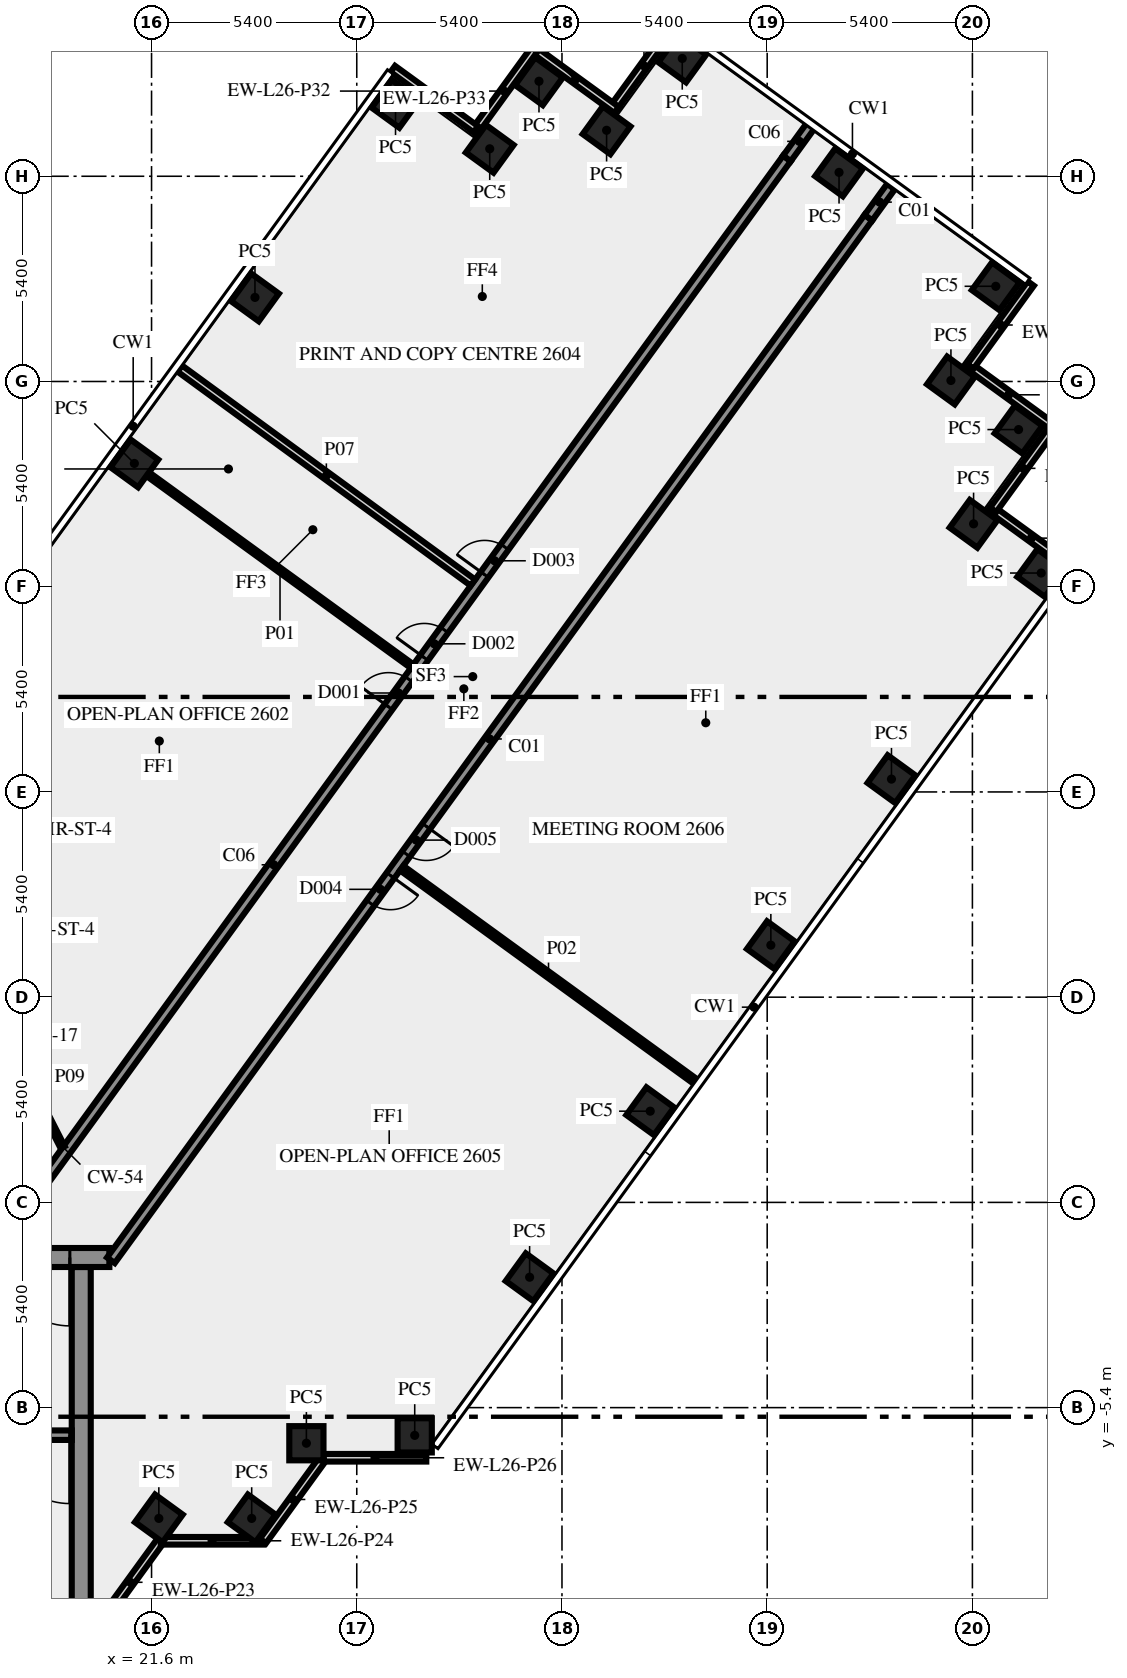
"""IFC4 building model, lengths in metres.
Left out: names, types, materials, properties, quantities, classifications, styles, units other than length and angle.
Written with IfcOpenShell. Run it as: python <this file> out.ifc"""

import sys

from ifc_helpers import new_model, si_unit, direction, frame, frame_2d, origin, origin_2d, place, context, subcontext, project, spatial, rectangle, extrude, element, fill, save


model = new_model("IFC4")
c1 = context("Model", 3, precision=1e-05, world=origin(), true_north=direction((0.0, 1.0)))
c2 = subcontext(c1, "Body", "Model", "MODEL_VIEW")
j1 = project(units=[si_unit("LENGTHUNIT", "METRE"), si_unit("PLANEANGLEUNIT", "RADIAN")], contexts=[c1])
p1 = place(None, origin())
s1 = spatial("IfcSite", under=j1, at=p1, CompositionType="ELEMENT")
p2 = place(p1, origin())
s2 = spatial("IfcBuilding", under=s1, at=p2, CompositionType="ELEMENT")
p3 = place(p2, frame((0.0, 0.0, 113.0)))
s3 = spatial("IfcBuildingStorey", under=s2, at=p3, CompositionType="ELEMENT", Elevation=113.0)
for number, where, z_axis, x_axis in (
    (1, (21.792, -8.315, 0.0), (0.0, 0.0, 1.0), (0.588, 0.809, 0.0)),
    (2, (24.235, -8.315, 0.0), (0.0, 0.0, 1.0), (0.588, 0.809, 0.0)),
    (3, (25.674, -6.337, 0.0), (0.0, 0.0, 1.0), (1.0, 0.0, 0.0)),
    (4, (28.525, -6.13, 0.0), (0.0, 0.0, 1.0), (1.0, 0.0, 0.0)),
    (5, (31.548, -1.969, 0.0), (0.0, 0.0, 1.0), (0.588, 0.809, 0.0)),
    (6, (34.722, 2.4, 0.0), (0.0, 0.0, 1.0), (0.588, 0.809, 0.0)),
    (7, (37.896, 6.769, 0.0), (0.0, 0.0, 1.0), (0.588, 0.809, 0.0)),
    (8, (41.07, 11.137, 0.0), (0.0, 0.0, 1.0), (0.588, 0.809, 0.0)),
    (9, (45.01, 16.56, 0.0), (0.0, 0.0, 1.0), (0.588, 0.809, 0.0)),
    (10, (43.231, 17.854, 0.0), (0.0, 0.0, 1.0), (0.588, 0.809, 0.0)),
    (11, (44.415, 20.335, 0.0), (0.0, 0.0, 1.0), (0.588, 0.809, 0.0)),
    (12, (42.635, 21.626, 0.0), (0.0, 0.0, 1.0), (-0.809, 0.588, 0.0)),
    (13, (43.815, 24.105, 0.0), (0.0, 0.0, 1.0), (-0.809, 0.588, 0.0)),
    (14, (39.691, 27.102, 0.0), (0.0, 0.0, 1.0), (-0.809, 0.588, 0.0)),
    (15, (35.565, 30.1, 0.0), (0.0, 0.0, 1.0), (-0.588, -0.809, 0.0)),
    (16, (33.574, 28.209, 0.0), (0.0, 0.0, 1.0), (-0.809, 0.588, 0.0)),
    (17, (31.795, 29.5, 0.0), (0.0, 0.0, 1.0), (-0.588, -0.809, 0.0)),
    (18, (30.499, 27.723, 0.0), (0.0, 0.0, 1.0), (-0.809, 0.588, 0.0)),
    (19, (28.02, 28.905, 0.0), (0.0, 0.0, 1.0), (-0.809, 0.588, 0.0)),
    (20, (24.321, 23.812, 0.0), (0.0, 0.0, 1.0), (-0.588, -0.809, 0.0)),
    (21, (21.147, 19.444, 0.0), (0.0, 0.0, 1.0), (-0.588, -0.809, 0.0)),
):
    element("IfcColumn", number, at=place(p3, frame(where, z_axis=z_axis, x_axis=x_axis)), inside=s3, PredefinedType="COLUMN", context=c2, shape_type="SweptSolid", body=[
        extrude(rectangle(XDim=0.9, YDim=0.9, at=origin_2d()), origin(), (0.0, 0.0, 1.0), 3.65),
    ])
for number, where, z_axis, x_axis in (
    (22, (45.842, 16.685, 0.0), (0.0, 0.0, 1.0), (-0.809, 0.588, 0.0)),
    (23, (43.746, 18.223, 0.0), (0.0, 0.0, 1.0), (0.588, 0.809, 0.0)),
    (24, (45.245, 20.456, 0.0), (0.0, 0.0, 1.0), (-0.809, 0.588, 0.0)),
):
    element("IfcWall", number, at=place(p3, frame(where, z_axis=z_axis, x_axis=x_axis)), inside=s3, PredefinedType="SOLIDWALL", context=c2, shape_type="SweptSolid", body=[
        extrude(rectangle(XDim=2.7, YDim=0.2, at=frame_2d((1.35, 0.0))), origin(), (0.0, 0.0, 1.0), 3.65),
    ])
p4 = place(p3, frame((20.253, -11.083, 0.0), z_axis=(0.0, 0.0, 1.0), x_axis=(0.587766567315, 0.809030569476, 0.0)))
e25 = element("IfcWall", 25, at=p4, inside=s3, PredefinedType="SOLIDWALL", context=c2, shape_type="SweptSolid", body=[
    extrude(rectangle(XDim=2.688, YDim=0.2, at=frame_2d((1.344, 0.0))), origin(), (0.0, 0.0, 1.0), 3.65),
])
p5 = place(p3, frame((21.843, -8.904, 0.0), z_axis=(0.0, 0.0, 1.0), x_axis=(1.0, 0.0, 0.0)))
e26 = element("IfcWall", 26, at=p5, inside=s3, PredefinedType="SOLIDWALL", context=c2, shape_type="SweptSolid", body=[
    extrude(rectangle(XDim=2.7, YDim=0.2, at=frame_2d((1.35, 0.0))), origin(), (0.0, 0.0, 1.0), 3.65),
])
p6 = place(p3, frame((24.533, -8.909, 0.0), z_axis=(0.0, 0.0, 1.0), x_axis=(0.587720002413, 0.809064397168, 0.0)))
e27 = element("IfcWall", 27, at=p6, inside=s3, PredefinedType="SOLIDWALL", context=c2, shape_type="SweptSolid", body=[
    extrude(rectangle(XDim=2.7, YDim=0.2, at=frame_2d((1.35, 0.0))), origin(), (0.0, 0.0, 1.0), 3.65),
])
for number, where, z_axis, x_axis in (
    (28, (26.13, -6.719, 0.0), (0.0, 0.0, 1.0), (1.0, 0.0, 0.0)),
    (29, (43.149, 21.994, 0.0), (0.0, 0.0, 1.0), (0.588, 0.809, 0.0)),
    (30, (35.351, 30.997, 0.0), (0.0, 0.0, 1.0), (-0.588, -0.809, 0.0)),
    (31, (33.838, 28.744, 0.0), (0.0, 0.0, 1.0), (-0.809, 0.588, 0.0)),
    (32, (31.67, 30.333, 0.0), (0.0, 0.0, 1.0), (-0.588, -0.809, 0.0)),
    (33, (30.133, 28.237, 0.0), (0.0, 0.0, 1.0), (-0.809, 0.588, 0.0)),
):
    element("IfcWall", number, at=place(p3, frame(where, z_axis=z_axis, x_axis=x_axis)), inside=s3, PredefinedType="SOLIDWALL", context=c2, shape_type="SweptSolid", body=[
        extrude(rectangle(XDim=2.7, YDim=0.2, at=frame_2d((1.35, 0.0))), origin(), (0.0, 0.0, 1.0), 3.65),
    ])
p7 = place(p3, frame((19.75, -10.5, 0.0), z_axis=(0.0, 0.0, 1.0), x_axis=(0.0, 1.0, 0.0)))
e34 = element("IfcWall", 34, at=p7, inside=s3, PredefinedType="SHEAR", context=c2, shape_type="SweptSolid", body=[
    extrude(rectangle(XDim=8.8, YDim=0.5, at=frame_2d((4.4, 0.0))), origin(), (0.0, 0.0, 1.0), 3.65),
])
p8 = place(p3, frame((19.5, -6.125, 0.0), z_axis=(0.0, 0.0, 1.0), x_axis=(-1.0, 0.0, 0.0)))
e35 = element("IfcWall", 35, at=p8, inside=s3, PredefinedType="SHEAR", context=c2, shape_type="SweptSolid", body=[
    extrude(rectangle(XDim=8.05, YDim=0.25, at=frame_2d((4.025, 0.0))), origin(), (0.0, 0.0, 1.0), 3.65),
])
p9 = place(p8, frame((0.05, 0.0, 0.0)))
e36 = element("IfcOpeningElement", 36, at=p9, cuts=e35, PredefinedType="OPENING", context=c2, shape_type="SweptSolid", body=[
    extrude(rectangle(XDim=1.8, YDim=2.1, at=frame_2d((0.9, 1.05))), frame((0.0, 0.135, 0.0), z_axis=(0.0, -1.0, 0.0), x_axis=(1.0, 0.0, 0.0)), (0.0, 0.0, 1.0), 0.27),
])
p10 = place(p3, frame((20.49, -1.45, 0.0), z_axis=(0.0, 0.0, 1.0), x_axis=(-1.0, 0.0, 0.0)))
e37 = element("IfcWall", 37, at=p10, inside=s3, PredefinedType="SHEAR", context=c2, shape_type="SweptSolid", body=[
    extrude(rectangle(XDim=40.98, YDim=0.5, at=frame_2d((20.49, 0.0))), origin(), (0.0, 0.0, 1.0), 3.65),
])
p11 = place(p10, frame((38.14, 0.0, 0.0)))
e38 = element("IfcOpeningElement", 38, at=p11, cuts=e37, PredefinedType="OPENING", context=c2, shape_type="SweptSolid", body=[
    extrude(rectangle(XDim=1.8, YDim=2.1, at=frame_2d((0.9, 1.05))), frame((0.0, 0.26, 0.0), z_axis=(0.0, -1.0, 0.0), x_axis=(1.0, 0.0, 0.0)), (0.0, 0.0, 1.0), 0.52),
])
p12 = place(p10, frame((36.728, 0.0, 0.0)))
e39 = element("IfcOpeningElement", 39, at=p12, cuts=e37, PredefinedType="OPENING", context=c2, shape_type="SweptSolid", body=[
    extrude(rectangle(XDim=0.8, YDim=2.1, at=frame_2d((0.4, 1.05))), frame((0.0, 0.26, 0.0), z_axis=(0.0, -1.0, 0.0), x_axis=(1.0, 0.0, 0.0)), (0.0, 0.0, 1.0), 0.52),
])
p13 = place(p10, frame((35.153, 0.0, 0.0)))
e40 = element("IfcOpeningElement", 40, at=p13, cuts=e37, PredefinedType="OPENING", context=c2, shape_type="SweptSolid", body=[
    extrude(rectangle(XDim=0.8, YDim=2.1, at=frame_2d((0.4, 1.05))), frame((0.0, 0.26, 0.0), z_axis=(0.0, -1.0, 0.0), x_axis=(1.0, 0.0, 0.0)), (0.0, 0.0, 1.0), 0.52),
])
p14 = place(p10, frame((32.94, 0.0, 0.0)))
e41 = element("IfcOpeningElement", 41, at=p14, cuts=e37, PredefinedType="OPENING", context=c2, shape_type="SweptSolid", body=[
    extrude(rectangle(XDim=0.9, YDim=2.1, at=frame_2d((0.45, 1.05))), frame((0.0, 0.26, 0.0), z_axis=(0.0, -1.0, 0.0), x_axis=(1.0, 0.0, 0.0)), (0.0, 0.0, 1.0), 0.52),
])
p15 = place(p10, frame((21.765, 0.0, 0.0)))
e42 = element("IfcOpeningElement", 42, at=p15, cuts=e37, PredefinedType="OPENING", context=c2, shape_type="SweptSolid", body=[
    extrude(rectangle(XDim=2.0, YDim=2.1, at=frame_2d((1.0, 1.05))), frame((0.0, 0.26, 0.0), z_axis=(0.0, -1.0, 0.0), x_axis=(1.0, 0.0, 0.0)), (0.0, 0.0, 1.0), 0.52),
])
p16 = place(p10, frame((7.14, 0.0, 0.0)))
e43 = element("IfcOpeningElement", 43, at=p16, cuts=e37, PredefinedType="OPENING", context=c2, shape_type="SweptSolid", body=[
    extrude(rectangle(XDim=0.9, YDim=2.1, at=frame_2d((0.45, 1.05))), frame((0.0, 0.26, 0.0), z_axis=(0.0, -1.0, 0.0), x_axis=(1.0, 0.0, 0.0)), (0.0, 0.0, 1.0), 0.52),
])
p17 = place(p10, frame((4.19, 0.0, 0.0)))
e44 = element("IfcOpeningElement", 44, at=p17, cuts=e37, PredefinedType="OPENING", context=c2, shape_type="SweptSolid", body=[
    extrude(rectangle(XDim=0.9, YDim=2.1, at=frame_2d((0.45, 1.05))), frame((0.0, 0.26, 0.0), z_axis=(0.0, -1.0, 0.0), x_axis=(1.0, 0.0, 0.0)), (0.0, 0.0, 1.0), 0.52),
])
p18 = place(p10, frame((1.04, 0.0, 0.0)))
e45 = element("IfcOpeningElement", 45, at=p18, cuts=e37, PredefinedType="OPENING", context=c2, shape_type="SweptSolid", body=[
    extrude(rectangle(XDim=1.8, YDim=2.1, at=frame_2d((0.9, 1.05))), frame((0.0, 0.26, 0.0), z_axis=(0.0, -1.0, 0.0), x_axis=(1.0, 0.0, 0.0)), (0.0, 0.0, 1.0), 0.52),
])
p19 = place(p3, frame((40.463, 25.911, 0.0), z_axis=(0.0, 0.0, 1.0), x_axis=(-0.587781654618, -0.809019608226, 0.0)))
e46 = element("IfcWall", 46, at=p19, inside=s3, PredefinedType="SOLIDWALL", context=c2, shape_type="SweptSolid", body=[
    extrude(rectangle(XDim=33.911, YDim=0.25, at=frame_2d((16.956, 0.0))), origin(), (0.0, 0.0, 1.0), 3.65),
])
p20 = place(p19, frame((21.396, 0.0, 0.0)))
e47 = element("IfcOpeningElement", 47, at=p20, cuts=e46, PredefinedType="OPENING", context=c2, shape_type="SweptSolid", body=[
    extrude(rectangle(XDim=0.9, YDim=2.1, at=frame_2d((0.45, 1.05))), frame((0.0, 0.135, 0.0), z_axis=(0.0, -1.0, 0.0), x_axis=(1.0, 0.0, 0.0)), (0.0, 0.0, 1.0), 0.27),
])
p21 = place(p19, frame((19.795, 0.0, 0.0)))
e48 = element("IfcOpeningElement", 48, at=p21, cuts=e46, PredefinedType="OPENING", context=c2, shape_type="SweptSolid", body=[
    extrude(rectangle(XDim=0.9, YDim=2.1, at=frame_2d((0.45, 1.05))), frame((0.0, 0.135, 0.0), z_axis=(0.0, -1.0, 0.0), x_axis=(1.0, 0.0, 0.0)), (0.0, 0.0, 1.0), 0.27),
])
p22 = place(p3, frame((17.545, -1.125, 0.0), z_axis=(0.0, 0.0, 1.0), x_axis=(0.587788021768, 0.809014982226, 0.0)))
e49 = element("IfcWall", 49, at=p22, inside=s3, PredefinedType="SOLIDWALL", context=c2, shape_type="SweptSolid", body=[
    extrude(rectangle(XDim=35.344, YDim=0.25, at=frame_2d((17.672, 0.0))), origin(), (0.0, 0.0, 1.0), 3.65),
])
p23 = place(p22, frame((17.508, 0.0, 0.0)))
e50 = element("IfcOpeningElement", 50, at=p23, cuts=e49, PredefinedType="OPENING", context=c2, shape_type="SweptSolid", body=[
    extrude(rectangle(XDim=0.9, YDim=2.1, at=frame_2d((0.45, 1.05))), frame((0.0, 0.135, 0.0), z_axis=(0.0, -1.0, 0.0), x_axis=(1.0, 0.0, 0.0)), (0.0, 0.0, 1.0), 0.27),
])
p24 = place(p22, frame((21.808, 0.0, 0.0)))
e51 = element("IfcOpeningElement", 51, at=p24, cuts=e49, PredefinedType="OPENING", context=c2, shape_type="SweptSolid", body=[
    extrude(rectangle(XDim=0.9, YDim=2.1, at=frame_2d((0.45, 1.05))), frame((0.0, 0.135, 0.0), z_axis=(0.0, -1.0, 0.0), x_axis=(1.0, 0.0, 0.0)), (0.0, 0.0, 1.0), 0.27),
])
p25 = place(p22, frame((19.108, 0.0, 0.0)))
e52 = element("IfcOpeningElement", 52, at=p25, cuts=e49, PredefinedType="OPENING", context=c2, shape_type="SweptSolid", body=[
    extrude(rectangle(XDim=0.9, YDim=2.1, at=frame_2d((0.45, 1.05))), frame((0.0, 0.135, 0.0), z_axis=(0.0, -1.0, 0.0), x_axis=(1.0, 0.0, 0.0)), (0.0, 0.0, 1.0), 0.27),
])
p26 = place(p3, frame((28.457, 14.108, 0.0), z_axis=(0.0, 0.0, 1.0), x_axis=(-0.808998863664, 0.587810206266, 0.0)))
e53 = element("IfcWall", 53, at=p26, inside=s3, PredefinedType="PARTITIONING", context=c2, shape_type="SweptSolid", body=[
    extrude(rectangle(XDim=8.595, YDim=0.12, at=frame_2d((4.297, 0.0))), origin(), (0.0, 0.0, 1.0), 3.65),
])
p27 = place(p3, frame((35.909, 3.183, 0.0), z_axis=(0.0, 0.0, 1.0), x_axis=(-0.809045492695, 0.587746025721, 0.0)))
e54 = element("IfcWall", 54, at=p27, inside=s3, PredefinedType="PARTITIONING", context=c2, shape_type="SweptSolid", body=[
    extrude(rectangle(XDim=9.551, YDim=0.15, at=frame_2d((4.775, 0.0))), origin(), (0.0, 0.0, 1.0), 2.75),
])
p28 = place(p3, frame((22.344, 21.94, 0.0), z_axis=(0.0, 0.0, 1.0), x_axis=(0.807610282865, -0.589716568371, 0.0)))
e55 = element("IfcWall", 55, at=p28, inside=s3, PredefinedType="SOLIDWALL", context=c2, shape_type="SweptSolid", body=[
    extrude(rectangle(XDim=9.55, YDim=0.2, at=frame_2d((4.775, 0.0))), origin(), (0.0, 0.0, 1.0), 2.75),
])
p29 = place(p3, frame((18.0, 3.925, 0.0), z_axis=(0.0, 0.0, 1.0), x_axis=(0.453950796792, -0.891026752736, 0.0)))
e56 = element("IfcWall", 56, at=p29, inside=s3, PredefinedType="PARTITIONING", context=c2, shape_type="SweptSolid", body=[
    extrude(rectangle(XDim=2.778, YDim=0.12, at=frame_2d((1.389, 0.0))), origin(), (0.0, 0.0, 1.0), 3.65),
])
p30 = place(p3, frame((40.463, 25.911, 0.0), z_axis=(0.0, 0.0, 1.0), x_axis=(0.587855200732, 0.808966169238, 0.0)))
e57 = element("IfcWall", 57, at=p30, inside=s3, PredefinedType="SOLIDWALL", context=c2, shape_type="SweptSolid", body=[
    extrude(rectangle(XDim=1.009, YDim=0.25, at=frame_2d((0.505, 0.0))), origin(), (0.0, 0.0, 1.0), 2.75),
])
p31 = place(p3, frame((38.32, 27.469, 0.0), z_axis=(0.0, 0.0, 1.0), x_axis=(0.587753086208, 0.809040363426, 0.0)))
e58 = element("IfcWall", 58, at=p31, inside=s3, PredefinedType="SOLIDWALL", context=c2, shape_type="SweptSolid", body=[
    extrude(rectangle(XDim=1.11, YDim=0.25, at=frame_2d((0.555, 0.0))), origin(), (0.0, 0.0, 1.0), 2.75),
])
p32 = place(p9, origin())
e59 = element("IfcDoor", 59, at=p32, inside=s3, OperationType="DOUBLE_DOOR_SINGLE_SWING", PredefinedType="DOOR", context=c2, shape_type="SweptSolid", body=[
    extrude(rectangle(XDim=1.8, YDim=2.1, at=frame_2d((0.9, 1.05))), frame((0.0, 0.025, 0.0), z_axis=(0.0, -1.0, 0.0), x_axis=(1.0, 0.0, 0.0)), (0.0, 0.0, 1.0), 0.05),
])
fill(e36, e59)
p33 = place(p18, origin())
e60 = element("IfcDoor", 60, at=p33, inside=s3, OperationType="DOUBLE_DOOR_SINGLE_SWING", PredefinedType="DOOR", context=c2, shape_type="SweptSolid", body=[
    extrude(rectangle(XDim=1.8, YDim=2.1, at=frame_2d((0.9, 1.05))), frame((0.0, 0.025, 0.0), z_axis=(0.0, -1.0, 0.0), x_axis=(1.0, 0.0, 0.0)), (0.0, 0.0, 1.0), 0.05),
])
fill(e45, e60)
p34 = place(p23, origin())
e61 = element("IfcDoor", 61, at=p34, inside=s3, OperationType="SINGLE_SWING_RIGHT", PredefinedType="DOOR", context=c2, shape_type="SweptSolid", body=[
    extrude(rectangle(XDim=0.9, YDim=2.1, at=frame_2d((0.45, 1.05))), frame((0.0, 0.025, 0.0), z_axis=(0.0, -1.0, 0.0), x_axis=(1.0, 0.0, 0.0)), (0.0, 0.0, 1.0), 0.05),
])
fill(e50, e61)
p35 = place(p20, origin())
e62 = element("IfcDoor", 62, at=p35, inside=s3, OperationType="SINGLE_SWING_LEFT", PredefinedType="DOOR", context=c2, shape_type="SweptSolid", body=[
    extrude(rectangle(XDim=0.9, YDim=2.1, at=frame_2d((0.45, 1.05))), frame((0.0, 0.025, 0.0), z_axis=(0.0, -1.0, 0.0), x_axis=(1.0, 0.0, 0.0)), (0.0, 0.0, 1.0), 0.05),
])
fill(e47, e62)
p36 = place(p21, origin())
e63 = element("IfcDoor", 63, at=p36, inside=s3, OperationType="SINGLE_SWING_RIGHT", PredefinedType="DOOR", context=c2, shape_type="SweptSolid", body=[
    extrude(rectangle(XDim=0.9, YDim=2.1, at=frame_2d((0.45, 1.05))), frame((0.0, 0.025, 0.0), z_axis=(0.0, -1.0, 0.0), x_axis=(1.0, 0.0, 0.0)), (0.0, 0.0, 1.0), 0.05),
])
fill(e48, e63)
p37 = place(p24, origin())
e64 = element("IfcDoor", 64, at=p37, inside=s3, OperationType="SINGLE_SWING_LEFT", PredefinedType="DOOR", context=c2, shape_type="SweptSolid", body=[
    extrude(rectangle(XDim=0.9, YDim=2.1, at=frame_2d((0.45, 1.05))), frame((0.0, 0.025, 0.0), z_axis=(0.0, -1.0, 0.0), x_axis=(1.0, 0.0, 0.0)), (0.0, 0.0, 1.0), 0.05),
])
fill(e51, e64)
p38 = place(p25, origin())
e65 = element("IfcDoor", 65, at=p38, inside=s3, OperationType="SINGLE_SWING_LEFT", PredefinedType="DOOR", context=c2, shape_type="SweptSolid", body=[
    extrude(rectangle(XDim=0.9, YDim=2.1, at=frame_2d((0.45, 1.05))), frame((0.0, 0.025, 0.0), z_axis=(0.0, -1.0, 0.0), x_axis=(1.0, 0.0, 0.0)), (0.0, 0.0, 1.0), 0.05),
])
fill(e52, e65)
save(model, sys.argv[1])
